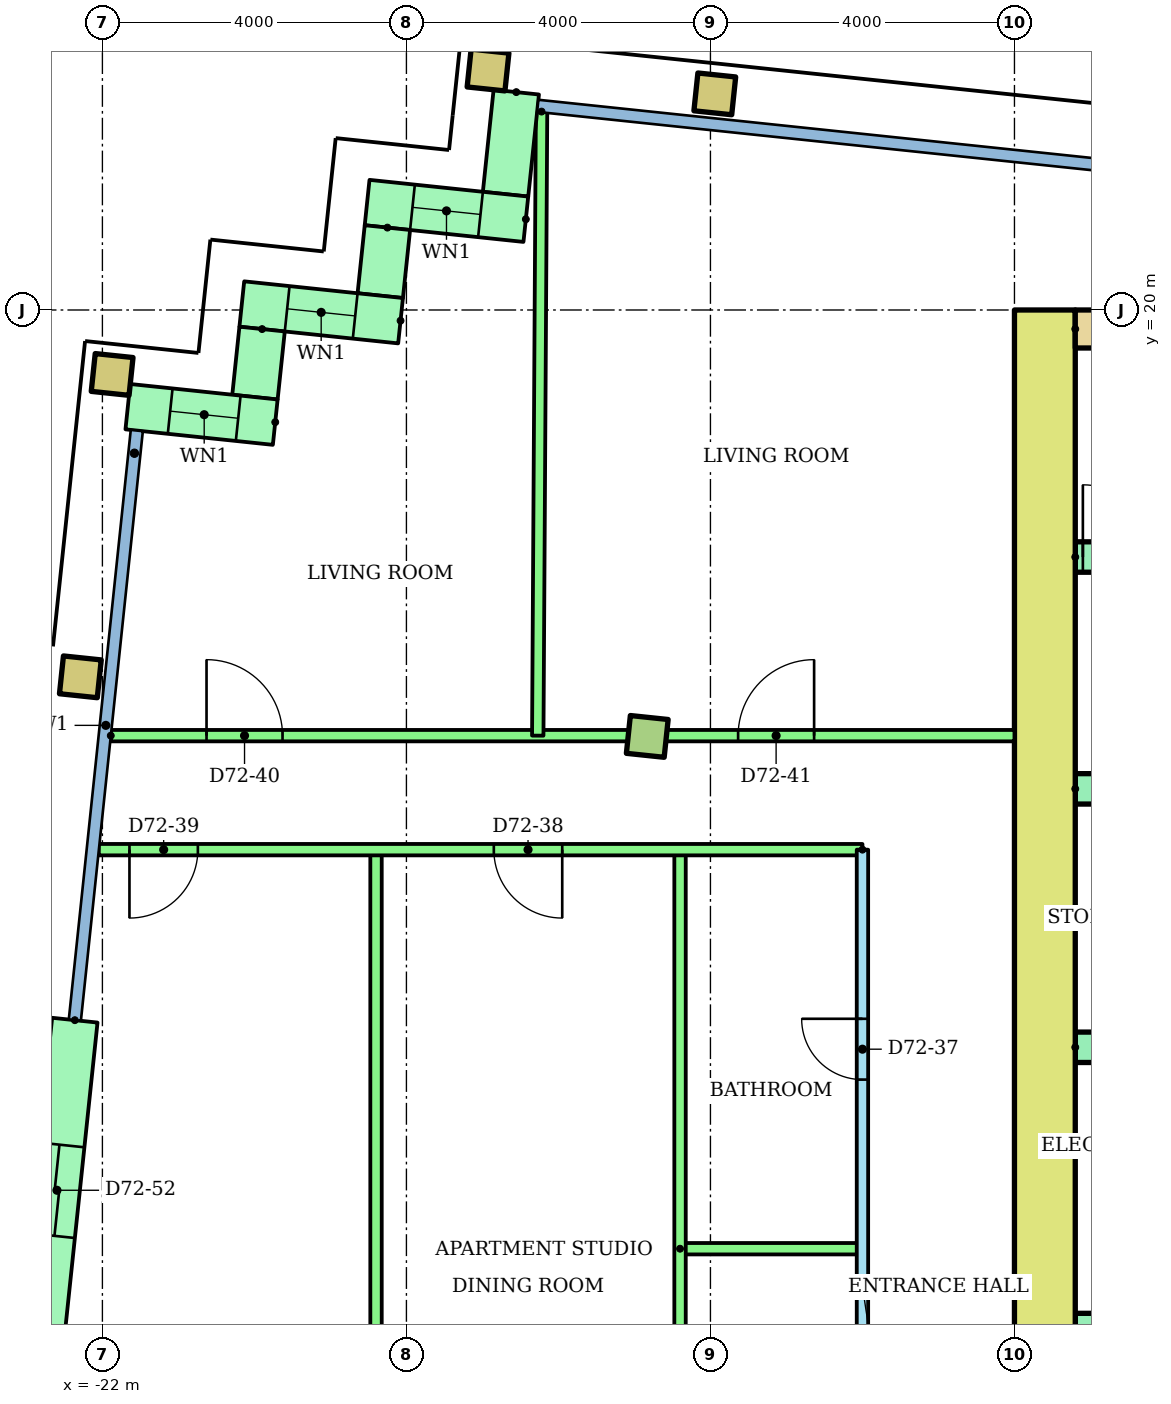
"""IFC4 building model, lengths in metres.
Left out: names, types, materials, properties, quantities, classifications, styles, units other than length and angle.
Written with IfcOpenShell. Run it as: python <this file> out.ifc"""

import sys

from ifc_helpers import new_model, si_unit, direction, frame, frame_2d, origin, origin_2d, place, context, subcontext, project, spatial, rectangle, hollow_rectangle, extrude, element, fill, save


model = new_model("IFC4")
c1 = context("Model", 3, precision=1e-05, world=origin(), true_north=direction((0.0, 1.0)))
c2 = subcontext(c1, "Body", "Model", "MODEL_VIEW")
j1 = project(units=[si_unit("LENGTHUNIT", "METRE"), si_unit("PLANEANGLEUNIT", "RADIAN")], contexts=[c1])
p1 = place(None, origin())
s1 = spatial("IfcSite", under=j1, at=p1, CompositionType="ELEMENT")
p2 = place(p1, origin())
s2 = spatial("IfcBuilding", under=s1, at=p2, CompositionType="ELEMENT")
p3 = place(p2, frame((0.0, 0.0, 275.5)))
s3 = spatial("IfcBuildingStorey", under=s2, at=p3, CompositionType="ELEMENT", Elevation=275.5)
p4 = place(p3, frame((-22.29, 15.174, 0.0), z_axis=(0.0, 0.0, 1.0), x_axis=(0.994521895368, -0.104528463268, 0.0)))
e1 = element("IfcColumn", 1, at=p4, inside=s3, PredefinedType="COLUMN", context=c2, shape_type="SweptSolid", body=[
    extrude(hollow_rectangle(XDim=0.5, YDim=0.5, WallThickness=0.025, at=origin_2d()), origin(), (0.0, 0.0, 1.0), 3.2),
])
p5 = place(p3, frame((-14.831, 14.39, 0.0), z_axis=(0.0, 0.0, 1.0), x_axis=(0.994521895368, -0.104528463268, 0.0)))
e2 = element("IfcColumn", 2, at=p5, inside=s3, PredefinedType="COLUMN", context=c2, shape_type="SweptSolid", body=[
    extrude(rectangle(XDim=0.5, YDim=0.5, at=origin_2d()), origin(), (0.0, 0.0, 1.0), 3.2),
])
for number, where, z_axis, x_axis in (
    (3, (-21.872, 19.152, 0.0), (0.0, 0.0, 1.0), (0.995, -0.105, 0.0)),
    (4, (-16.926, 23.157, 0.0), (0.0, 0.0, 1.0), (0.995, -0.105, 0.0)),
    (5, (-13.943, 22.843, 0.0), (0.0, 0.0, 1.0), (0.995, -0.105, 0.0)),
):
    element("IfcColumn", number, at=place(p3, frame(where, z_axis=z_axis, x_axis=x_axis)), inside=s3, PredefinedType="COLUMN", context=c2, shape_type="SweptSolid", body=[
        extrude(hollow_rectangle(XDim=0.5, YDim=0.5, WallThickness=0.025, at=origin_2d()), origin(), (0.0, 0.0, 1.0), 3.2),
    ])
p6 = place(p3, frame((-16.555, 22.866, 0.0), z_axis=(0.0, 0.0, 1.0), x_axis=(-0.104515354875, -0.994523273029, 0.0)))
e6 = element("IfcWall", 6, at=p6, inside=s3, PredefinedType="STANDARD", context=c2, shape_type="SweptSolid", body=[
    extrude(rectangle(XDim=1.35, YDim=0.6, at=frame_2d((0.675, 0.0))), origin(), (0.0, 0.0, 1.0), 2.92),
])
p7 = place(p3, frame((-16.429, 21.194, 0.0), z_axis=(0.0, 0.0, 1.0), x_axis=(-0.994522640205, 0.104521376379, 0.0)))
e7 = element("IfcWall", 7, at=p7, inside=s3, PredefinedType="STANDARD", context=c2, shape_type="SweptSolid", body=[
    extrude(rectangle(XDim=2.1, YDim=0.6, at=frame_2d((1.05, 0.0))), origin(), (0.0, 0.0, 1.0), 2.92),
])
p8 = place(p7, frame((0.6, 0.0, 0.9)))
e8 = element("IfcOpeningElement", 8, at=p8, cuts=e7, PredefinedType="OPENING", context=c2, shape_type="SweptSolid", body=[
    extrude(rectangle(XDim=0.9, YDim=1.5, at=frame_2d((0.45, 0.75))), frame((0.0, 0.31, 0.0), z_axis=(0.0, -1.0, 0.0), x_axis=(1.0, 0.0, 0.0)), (0.0, 0.0, 1.0), 0.62),
])
p9 = place(p3, frame((-18.25, 21.084, 0.0), z_axis=(0.0, 0.0, 1.0), x_axis=(-0.104416541099, -0.994533652495, 0.0)))
e9 = element("IfcWall", 9, at=p9, inside=s3, PredefinedType="STANDARD", context=c2, shape_type="SweptSolid", body=[
    extrude(rectangle(XDim=0.9, YDim=0.6, at=frame_2d((0.45, 0.0))), origin(), (0.0, 0.0, 1.0), 2.92),
])
p10 = place(p3, frame((-18.077, 19.859, 0.0), z_axis=(0.0, 0.0, 1.0), x_axis=(-0.994522640205, 0.104521376379, 0.0)))
e10 = element("IfcWall", 10, at=p10, inside=s3, PredefinedType="STANDARD", context=c2, shape_type="SweptSolid", body=[
    extrude(rectangle(XDim=2.1, YDim=0.6, at=frame_2d((1.05, 0.0))), origin(), (0.0, 0.0, 1.0), 2.92),
])
p11 = place(p10, frame((0.6, 0.0, 0.9)))
e11 = element("IfcOpeningElement", 11, at=p11, cuts=e10, PredefinedType="OPENING", context=c2, shape_type="SweptSolid", body=[
    extrude(rectangle(XDim=0.9, YDim=1.5, at=frame_2d((0.45, 0.75))), frame((0.0, 0.31, 0.0), z_axis=(0.0, -1.0, 0.0), x_axis=(1.0, 0.0, 0.0)), (0.0, 0.0, 1.0), 0.62),
])
p12 = place(p3, frame((-19.899, 19.749, 0.0), z_axis=(0.0, 0.0, 1.0), x_axis=(-0.104741284723, -0.994499503909, 0.0)))
e12 = element("IfcWall", 12, at=p12, inside=s3, PredefinedType="STANDARD", context=c2, shape_type="SweptSolid", body=[
    extrude(rectangle(XDim=0.9, YDim=0.6, at=frame_2d((0.45, 0.0))), origin(), (0.0, 0.0, 1.0), 2.92),
])
p13 = place(p3, frame((-19.726, 18.524, 0.0), z_axis=(0.0, 0.0, 1.0), x_axis=(-0.994534226826, 0.104411070641, 0.0)))
e13 = element("IfcWall", 13, at=p13, inside=s3, PredefinedType="STANDARD", context=c2, shape_type="SweptSolid", body=[
    extrude(rectangle(XDim=1.95, YDim=0.6, at=frame_2d((0.975, 0.0))), origin(), (0.0, 0.0, 1.0), 2.92),
])
p14 = place(p13, frame((0.49, 0.0, 0.9)))
e14 = element("IfcOpeningElement", 14, at=p14, cuts=e13, PredefinedType="OPENING", context=c2, shape_type="SweptSolid", body=[
    extrude(rectangle(XDim=0.9, YDim=1.5, at=frame_2d((0.45, 0.75))), frame((0.0, 0.31, 0.0), z_axis=(0.0, -1.0, 0.0), x_axis=(1.0, 0.0, 0.0)), (0.0, 0.0, 1.0), 0.62),
])
p15 = place(p3, frame((-22.363, 10.657, 0.0), z_axis=(0.0, 0.0, 1.0), x_axis=(-0.104492739125, -0.994525649478, 0.0)))
e15 = element("IfcWall", 15, at=p15, inside=s3, PredefinedType="STANDARD", context=c2, shape_type="SweptSolid", body=[
    extrude(rectangle(XDim=4.5, YDim=0.6, at=frame_2d((2.25, 0.0))), origin(), (0.0, 0.0, 1.0), 2.92),
])
p16 = place(p15, frame((1.65, 0.0, 0.0)))
e16 = element("IfcOpeningElement", 16, at=p16, cuts=e15, PredefinedType="OPENING", context=c2, shape_type="SweptSolid", body=[
    extrude(rectangle(XDim=1.2, YDim=2.1, at=frame_2d((0.6, 1.05))), frame((0.0, 0.31, 0.0), z_axis=(0.0, -1.0, 0.0), x_axis=(1.0, 0.0, 0.0)), (0.0, 0.0, 1.0), 0.62),
])
p17 = place(p3, frame((-9.6, 6.4, 0.0), z_axis=(0.0, 0.0, 1.0), x_axis=(0.0, 1.0, 0.0)))
e17 = element("IfcWall", 17, at=p17, inside=s3, PredefinedType="SHEAR", context=c2, shape_type="SweptSolid", body=[
    extrude(rectangle(XDim=13.6, YDim=0.8, at=frame_2d((6.8, 0.0))), origin(), (0.0, 0.0, 1.0), 2.92),
])
p18 = place(p3, frame((-9.2, 19.75, 0.0)))
e18 = element("IfcWall", 18, at=p18, inside=s3, PredefinedType="SHEAR", context=c2, shape_type="SweptSolid", body=[
    extrude(rectangle(XDim=18.4, YDim=0.5, at=frame_2d((9.2, 0.0))), origin(), (0.0, 0.0, 1.0), 2.92),
])
p19 = place(p3, frame((-9.2, 6.6, 0.0)))
e19 = element("IfcWall", 19, at=p19, inside=s3, PredefinedType="SHEAR", context=c2, shape_type="SweptSolid", body=[
    extrude(rectangle(XDim=18.4, YDim=0.4, at=frame_2d((9.2, 0.0))), origin(), (0.0, 0.0, 1.0), 2.92),
])
p20 = place(p19, frame((8.3, 0.0, 0.0)))
e20 = element("IfcOpeningElement", 20, at=p20, cuts=e19, PredefinedType="OPENING", context=c2, shape_type="SweptSolid", body=[
    extrude(rectangle(XDim=1.8, YDim=2.1, at=frame_2d((0.9, 1.05))), frame((0.0, 0.21, 0.0), z_axis=(0.0, -1.0, 0.0), x_axis=(1.0, 0.0, 0.0)), (0.0, 0.0, 1.0), 0.42),
])
p21 = place(p19, frame((3.8, 0.0, 0.0)))
e21 = element("IfcOpeningElement", 21, at=p21, cuts=e19, PredefinedType="OPENING", context=c2, shape_type="SweptSolid", body=[
    extrude(rectangle(XDim=1.8, YDim=2.1, at=frame_2d((0.9, 1.05))), frame((0.0, 0.21, 0.0), z_axis=(0.0, -1.0, 0.0), x_axis=(1.0, 0.0, 0.0)), (0.0, 0.0, 1.0), 0.42),
])
p22 = place(p19, frame((12.8, 0.0, 0.0)))
e22 = element("IfcOpeningElement", 22, at=p22, cuts=e19, PredefinedType="OPENING", context=c2, shape_type="SweptSolid", body=[
    extrude(rectangle(XDim=1.8, YDim=2.1, at=frame_2d((0.9, 1.05))), frame((0.0, 0.21, 0.0), z_axis=(0.0, -1.0, 0.0), x_axis=(1.0, 0.0, 0.0)), (0.0, 0.0, 1.0), 0.42),
])
p23 = place(p3, frame((-9.2, 10.3, 0.0)))
e23 = element("IfcWall", 23, at=p23, inside=s3, PredefinedType="SHEAR", context=c2, shape_type="SweptSolid", body=[
    extrude(rectangle(XDim=8.0, YDim=0.4, at=frame_2d((4.0, 0.0))), origin(), (0.0, 0.0, 1.0), 2.92),
])
p24 = place(p23, frame((3.35, 0.0, 0.0)))
e24 = element("IfcOpeningElement", 24, at=p24, cuts=e23, PredefinedType="OPENING", context=c2, shape_type="SweptSolid", body=[
    extrude(rectangle(XDim=1.1, YDim=2.1, at=frame_2d((0.55, 1.05))), frame((0.0, 0.21, 0.0), z_axis=(0.0, -1.0, 0.0), x_axis=(1.0, 0.0, 0.0)), (0.0, 0.0, 1.0), 0.42),
])
p25 = place(p23, frame((6.083, 0.0, 0.0)))
e25 = element("IfcOpeningElement", 25, at=p25, cuts=e23, PredefinedType="OPENING", context=c2, shape_type="SweptSolid", body=[
    extrude(rectangle(XDim=1.1, YDim=2.1, at=frame_2d((0.55, 1.05))), frame((0.0, 0.21, 0.0), z_axis=(0.0, -1.0, 0.0), x_axis=(1.0, 0.0, 0.0)), (0.0, 0.0, 1.0), 0.42),
])
p26 = place(p23, frame((0.917, 0.0, 0.0)))
e26 = element("IfcOpeningElement", 26, at=p26, cuts=e23, PredefinedType="OPENING", context=c2, shape_type="SweptSolid", body=[
    extrude(rectangle(XDim=1.0, YDim=2.1, at=frame_2d((0.5, 1.05))), frame((0.0, 0.21, 0.0), z_axis=(0.0, -1.0, 0.0), x_axis=(1.0, 0.0, 0.0)), (0.0, 0.0, 1.0), 0.42),
])
p27 = place(p3, frame((-9.2, 13.7, 0.0)))
e27 = element("IfcWall", 27, at=p27, inside=s3, PredefinedType="SHEAR", context=c2, shape_type="SweptSolid", body=[
    extrude(rectangle(XDim=8.0, YDim=0.4, at=frame_2d((4.0, 0.0))), origin(), (0.0, 0.0, 1.0), 2.92),
])
p28 = place(p3, frame((-9.2, 16.75, 0.0)))
e28 = element("IfcWall", 28, at=p28, inside=s3, PredefinedType="SHEAR", context=c2, shape_type="SweptSolid", body=[
    extrude(rectangle(XDim=18.4, YDim=0.4, at=frame_2d((9.2, 0.0))), origin(), (0.0, 0.0, 1.0), 2.92),
])
p29 = place(p28, frame((0.1, 0.0, 0.0)))
e29 = element("IfcOpeningElement", 29, at=p29, cuts=e28, PredefinedType="OPENING", context=c2, shape_type="SweptSolid", body=[
    extrude(rectangle(XDim=0.95, YDim=2.1, at=frame_2d((0.475, 1.05))), frame((0.0, 0.21, 0.0), z_axis=(0.0, -1.0, 0.0), x_axis=(1.0, 0.0, 0.0)), (0.0, 0.0, 1.0), 0.42),
])
p30 = place(p28, frame((6.1, 0.0, 0.0)))
e30 = element("IfcOpeningElement", 30, at=p30, cuts=e28, PredefinedType="OPENING", context=c2, shape_type="SweptSolid", body=[
    extrude(rectangle(XDim=0.95, YDim=2.1, at=frame_2d((0.475, 1.05))), frame((0.0, 0.21, 0.0), z_axis=(0.0, -1.0, 0.0), x_axis=(1.0, 0.0, 0.0)), (0.0, 0.0, 1.0), 0.42),
])
p31 = place(p28, frame((12.1, 0.0, 0.0)))
e31 = element("IfcOpeningElement", 31, at=p31, cuts=e28, PredefinedType="OPENING", context=c2, shape_type="SweptSolid", body=[
    extrude(rectangle(XDim=0.95, YDim=2.1, at=frame_2d((0.475, 1.05))), frame((0.0, 0.21, 0.0), z_axis=(0.0, -1.0, 0.0), x_axis=(1.0, 0.0, 0.0)), (0.0, 0.0, 1.0), 0.42),
])
p32 = place(p3, frame((-12.0, 1.4, 0.0), z_axis=(0.0, 0.0, 1.0), x_axis=(0.0, 1.0, 0.0)))
e32 = element("IfcWall", 32, at=p32, inside=s3, PredefinedType="PARTITIONING", context=c2, shape_type="SweptSolid", body=[
    extrude(rectangle(XDim=11.5, YDim=0.15, at=frame_2d((5.75, 0.0))), origin(), (0.0, 0.0, 1.0), 2.4),
])
p33 = place(p32, frame((2.675, 0.0, 0.0)))
e33 = element("IfcOpeningElement", 33, at=p33, cuts=e32, PredefinedType="OPENING", context=c2, shape_type="SweptSolid", body=[
    extrude(rectangle(XDim=0.9, YDim=2.1, at=frame_2d((0.45, 1.05))), frame((0.0, 0.085, 0.0), z_axis=(0.0, -1.0, 0.0), x_axis=(1.0, 0.0, 0.0)), (0.0, 0.0, 1.0), 0.17),
])
p34 = place(p32, frame((8.475, 0.0, 0.0)))
e34 = element("IfcOpeningElement", 34, at=p34, cuts=e32, PredefinedType="OPENING", context=c2, shape_type="SweptSolid", body=[
    extrude(rectangle(XDim=0.8, YDim=2.1, at=frame_2d((0.4, 1.05))), frame((0.0, 0.085, 0.0), z_axis=(0.0, -1.0, 0.0), x_axis=(1.0, 0.0, 0.0)), (0.0, 0.0, 1.0), 0.17),
])
p35 = place(p3, frame((-14.4, 7.65, 0.0)))
e35 = element("IfcWall", 35, at=p35, inside=s3, PredefinedType="PARTITIONING", context=c2, shape_type="SweptSolid", body=[
    extrude(rectangle(XDim=2.4, YDim=0.15, at=frame_2d((1.2, 0.0))), origin(), (0.0, 0.0, 1.0), 2.4),
])
for number, where, z_axis, x_axis in (
    (36, (-14.4, 1.4, 0.0), (0.0, 0.0, 1.0), (0.0, 1.0, 0.0)),
    (37, (-18.4, 1.4, 0.0), (0.0, 0.0, 1.0), (0.0, 1.0, 0.0)),
):
    element("IfcWall", number, at=place(p3, frame(where, z_axis=z_axis, x_axis=x_axis)), inside=s3, PredefinedType="PARTITIONING", context=c2, shape_type="SweptSolid", body=[
        extrude(rectangle(XDim=11.5, YDim=0.15, at=frame_2d((5.75, 0.0))), origin(), (0.0, 0.0, 1.0), 2.4),
    ])
p36 = place(p3, frame((-12.0, 12.9, 0.0), z_axis=(0.0, 0.0, 1.0), x_axis=(-1.0, 0.0, 0.0)))
e38 = element("IfcWall", 38, at=p36, inside=s3, PredefinedType="PARTITIONING", context=c2, shape_type="SweptSolid", body=[
    extrude(rectangle(XDim=10.047, YDim=0.15, at=frame_2d((5.024, 0.0))), origin(), (0.0, 0.0, 1.0), 2.4),
])
p37 = place(p36, frame((3.95, 0.0, 0.0)))
e39 = element("IfcOpeningElement", 39, at=p37, cuts=e38, PredefinedType="OPENING", context=c2, shape_type="SweptSolid", body=[
    extrude(rectangle(XDim=0.9, YDim=2.1, at=frame_2d((0.45, 1.05))), frame((0.0, 0.085, 0.0), z_axis=(0.0, -1.0, 0.0), x_axis=(1.0, 0.0, 0.0)), (0.0, 0.0, 1.0), 0.17),
])
p38 = place(p36, frame((8.744, 0.0, 0.0)))
e40 = element("IfcOpeningElement", 40, at=p38, cuts=e38, PredefinedType="OPENING", context=c2, shape_type="SweptSolid", body=[
    extrude(rectangle(XDim=0.9, YDim=2.1, at=frame_2d((0.45, 1.05))), frame((0.0, 0.085, 0.0), z_axis=(0.0, -1.0, 0.0), x_axis=(1.0, 0.0, 0.0)), (0.0, 0.0, 1.0), 0.17),
])
p39 = place(p3, frame((-21.89, 14.4, 0.0)))
e41 = element("IfcWall", 41, at=p39, inside=s3, PredefinedType="PARTITIONING", context=c2, shape_type="SweptSolid", body=[
    extrude(rectangle(XDim=11.89, YDim=0.15, at=frame_2d((5.945, 0.0))), origin(), (0.0, 0.0, 1.0), 2.4),
])
p40 = place(p39, frame((1.26, 0.0, 0.0)))
e42 = element("IfcOpeningElement", 42, at=p40, cuts=e41, PredefinedType="OPENING", context=c2, shape_type="SweptSolid", body=[
    extrude(rectangle(XDim=1.0, YDim=2.1, at=frame_2d((0.5, 1.05))), frame((0.0, 0.085, 0.0), z_axis=(0.0, -1.0, 0.0), x_axis=(1.0, 0.0, 0.0)), (0.0, 0.0, 1.0), 0.17),
])
p41 = place(p39, frame((8.254, 0.0, 0.0)))
e43 = element("IfcOpeningElement", 43, at=p41, cuts=e41, PredefinedType="OPENING", context=c2, shape_type="SweptSolid", body=[
    extrude(rectangle(XDim=1.0, YDim=2.1, at=frame_2d((0.5, 1.05))), frame((0.0, 0.085, 0.0), z_axis=(0.0, -1.0, 0.0), x_axis=(1.0, 0.0, 0.0)), (0.0, 0.0, 1.0), 0.17),
])
p42 = place(p3, frame((-16.222, 22.61, 0.0), z_axis=(0.0, 0.0, 1.0), x_axis=(-0.006095634594, -0.999981421447, 0.0)))
e44 = element("IfcWall", 44, at=p42, inside=s3, PredefinedType="PARTITIONING", context=c2, shape_type="SweptSolid", body=[
    extrude(rectangle(XDim=8.211, YDim=0.15, at=frame_2d((4.105, 0.0))), origin(), (0.0, 0.0, 1.0), 2.4),
])
p43 = place(p8, origin())
e45 = element("IfcWindow", 45, at=p43, inside=s3, PartitioningType="SINGLE_PANEL", PredefinedType="WINDOW", context=c2, shape_type="SweptSolid", body=[
    extrude(rectangle(XDim=0.9, YDim=1.5, at=frame_2d((0.45, 0.75))), frame((0.0, 0.03, 0.0), z_axis=(0.0, -1.0, 0.0), x_axis=(1.0, 0.0, 0.0)), (0.0, 0.0, 1.0), 0.06),
])
fill(e8, e45)
p44 = place(p11, origin())
e46 = element("IfcWindow", 46, at=p44, inside=s3, PartitioningType="SINGLE_PANEL", PredefinedType="WINDOW", context=c2, shape_type="SweptSolid", body=[
    extrude(rectangle(XDim=0.9, YDim=1.5, at=frame_2d((0.45, 0.75))), frame((0.0, 0.03, 0.0), z_axis=(0.0, -1.0, 0.0), x_axis=(1.0, 0.0, 0.0)), (0.0, 0.0, 1.0), 0.06),
])
fill(e11, e46)
p45 = place(p14, origin())
e47 = element("IfcWindow", 47, at=p45, inside=s3, PartitioningType="SINGLE_PANEL", PredefinedType="WINDOW", context=c2, shape_type="SweptSolid", body=[
    extrude(rectangle(XDim=0.9, YDim=1.5, at=frame_2d((0.45, 0.75))), frame((0.0, 0.03, 0.0), z_axis=(0.0, -1.0, 0.0), x_axis=(1.0, 0.0, 0.0)), (0.0, 0.0, 1.0), 0.06),
])
fill(e14, e47)
p46 = place(p29, origin())
e48 = element("IfcDoor", 48, at=p46, inside=s3, OperationType="SINGLE_SWING_LEFT", PredefinedType="DOOR", context=c2, shape_type="SweptSolid", body=[
    extrude(rectangle(XDim=0.95, YDim=2.1, at=frame_2d((0.475, 1.05))), frame((0.0, 0.025, 0.0), z_axis=(0.0, -1.0, 0.0), x_axis=(1.0, 0.0, 0.0)), (0.0, 0.0, 1.0), 0.05),
])
fill(e29, e48)
p47 = place(p34, origin())
e49 = element("IfcDoor", 49, at=p47, inside=s3, OperationType="SINGLE_SWING_RIGHT", PredefinedType="DOOR", context=c2, shape_type="SweptSolid", body=[
    extrude(rectangle(XDim=0.8, YDim=2.1, at=frame_2d((0.4, 1.05))), frame((0.0, 0.025, 0.0), z_axis=(0.0, -1.0, 0.0), x_axis=(1.0, 0.0, 0.0)), (0.0, 0.0, 1.0), 0.05),
])
fill(e34, e49)
p48 = place(p37, origin())
e50 = element("IfcDoor", 50, at=p48, inside=s3, OperationType="SINGLE_SWING_LEFT", PredefinedType="DOOR", context=c2, shape_type="SweptSolid", body=[
    extrude(rectangle(XDim=0.9, YDim=2.1, at=frame_2d((0.45, 1.05))), frame((0.0, 0.025, 0.0), z_axis=(0.0, -1.0, 0.0), x_axis=(1.0, 0.0, 0.0)), (0.0, 0.0, 1.0), 0.05),
])
fill(e39, e50)
p49 = place(p38, origin())
e51 = element("IfcDoor", 51, at=p49, inside=s3, OperationType="SINGLE_SWING_RIGHT", PredefinedType="DOOR", context=c2, shape_type="SweptSolid", body=[
    extrude(rectangle(XDim=0.9, YDim=2.1, at=frame_2d((0.45, 1.05))), frame((0.0, 0.025, 0.0), z_axis=(0.0, -1.0, 0.0), x_axis=(1.0, 0.0, 0.0)), (0.0, 0.0, 1.0), 0.05),
])
fill(e40, e51)
p50 = place(p40, origin())
e52 = element("IfcDoor", 52, at=p50, inside=s3, OperationType="SINGLE_SWING_LEFT", PredefinedType="DOOR", context=c2, shape_type="SweptSolid", body=[
    extrude(rectangle(XDim=1.0, YDim=2.1, at=frame_2d((0.5, 1.05))), frame((0.0, 0.025, 0.0), z_axis=(0.0, -1.0, 0.0), x_axis=(1.0, 0.0, 0.0)), (0.0, 0.0, 1.0), 0.05),
])
fill(e42, e52)
p51 = place(p41, origin())
e53 = element("IfcDoor", 53, at=p51, inside=s3, OperationType="SINGLE_SWING_RIGHT", PredefinedType="DOOR", context=c2, shape_type="SweptSolid", body=[
    extrude(rectangle(XDim=1.0, YDim=2.1, at=frame_2d((0.5, 1.05))), frame((0.0, 0.025, 0.0), z_axis=(0.0, -1.0, 0.0), x_axis=(1.0, 0.0, 0.0)), (0.0, 0.0, 1.0), 0.05),
])
fill(e43, e53)
p52 = place(p16, origin())
e54 = element("IfcDoor", 54, at=p52, inside=s3, OperationType="SLIDING_TO_LEFT", PredefinedType="DOOR", context=c2, shape_type="SweptSolid", body=[
    extrude(rectangle(XDim=1.2, YDim=2.1, at=frame_2d((0.6, 1.05))), frame((0.0, 0.025, 0.0), z_axis=(0.0, -1.0, 0.0), x_axis=(1.0, 0.0, 0.0)), (0.0, 0.0, 1.0), 0.05),
])
fill(e16, e54)
save(model, sys.argv[1])
